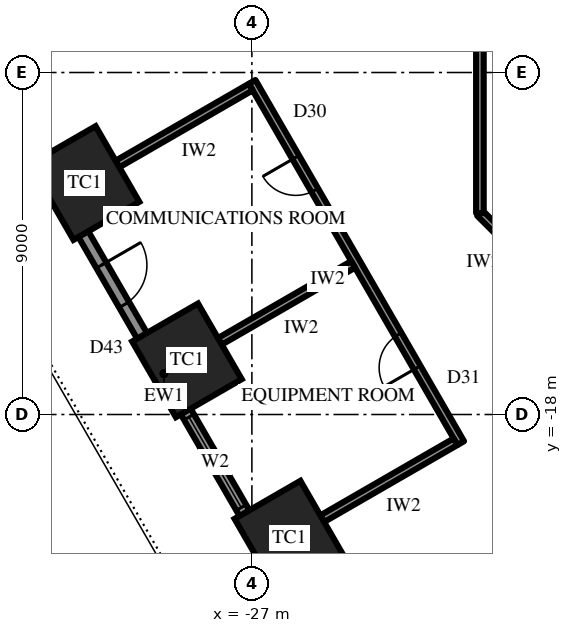
"""IFC4 building model, lengths in metres.
Left out: names, types, materials, properties, quantities, classifications, styles, units other than length and angle.
Written with IfcOpenShell. Run it as: python <this file> out.ifc"""

import sys

from ifc_helpers import new_model, si_unit, direction, frame, frame_2d, origin, origin_2d, place, context, subcontext, project, spatial, rectangle, extrude, element, fill, save


model = new_model("IFC4")
c1 = context("Model", 3, precision=1e-05, world=origin(), true_north=direction((0.0, 1.0)))
c2 = subcontext(c1, "Body", "Model", "MODEL_VIEW")
j1 = project(units=[si_unit("LENGTHUNIT", "METRE"), si_unit("PLANEANGLEUNIT", "RADIAN")], contexts=[c1])
p1 = place(None, origin())
s1 = spatial("IfcSite", under=j1, at=p1, CompositionType="ELEMENT")
p2 = place(p1, origin())
s2 = spatial("IfcBuilding", under=s1, at=p2, CompositionType="ELEMENT")
p3 = place(p2, frame((0.0, 0.0, 31.9)))
s3 = spatial("IfcBuildingStorey", under=s2, at=p3, CompositionType="ELEMENT", Elevation=31.9)
for number, where, z_axis, x_axis in (
    (1, (-31.403, -11.908, 0.0), (0.0, 0.0, 1.0), (0.5, -0.866, 0.0)),
    (2, (-28.709, -16.575, 0.0), (0.0, 0.0, 1.0), (0.5, -0.866, 0.0)),
    (3, (-26.014, -21.242, 0.0), (0.0, 0.0, 1.0), (0.5, -0.866, 0.0)),
):
    element("IfcColumn", number, at=place(p3, frame(where, z_axis=z_axis, x_axis=x_axis)), inside=s3, PredefinedType="COLUMN", context=c2, shape_type="SweptSolid", body=[
        extrude(rectangle(XDim=2.3, YDim=2.0, at=origin_2d()), origin(), (0.0, 0.0, 1.0), 4.2),
    ])
p4 = place(p3, frame((-37.398, -2.925, 0.0), z_axis=(0.0, 0.0, 1.0), x_axis=(0.499999163675, -0.866025886636, 0.0)))
e4 = element("IfcWall", 4, at=p4, inside=s3, PredefinedType="SOLIDWALL", context=c2, shape_type="SweptSolid", body=[
    extrude(rectangle(XDim=32.332, YDim=0.3, at=frame_2d((16.166, 0.0))), origin(), (0.0, 0.0, 1.0), 2.7),
])
p5 = place(p4, frame((1.319, 0.0, 0.6)))
e5 = element("IfcOpeningElement", 5, at=p5, cuts=e4, PredefinedType="OPENING", context=c2, shape_type="SweptSolid", body=[
    extrude(rectangle(XDim=2.75, YDim=1.85, at=frame_2d((1.375, 0.925))), frame((0.0, 0.16, 0.0), z_axis=(0.0, -1.0, 0.0), x_axis=(1.0, 0.0, 0.0)), (0.0, 0.0, 1.0), 0.32),
])
p6 = place(p4, frame((6.708, 0.0, 0.6)))
e6 = element("IfcOpeningElement", 6, at=p6, cuts=e4, PredefinedType="OPENING", context=c2, shape_type="SweptSolid", body=[
    extrude(rectangle(XDim=2.75, YDim=1.85, at=frame_2d((1.375, 0.925))), frame((0.0, 0.16, 0.0), z_axis=(0.0, -1.0, 0.0), x_axis=(1.0, 0.0, 0.0)), (0.0, 0.0, 1.0), 0.32),
])
p7 = place(p4, frame((12.872, 0.0, 0.0)))
e7 = element("IfcOpeningElement", 7, at=p7, cuts=e4, PredefinedType="OPENING", context=c2, shape_type="SweptSolid", body=[
    extrude(rectangle(XDim=1.2, YDim=2.4, at=frame_2d((0.6, 1.2))), frame((0.0, 0.16, 0.0), z_axis=(0.0, -1.0, 0.0), x_axis=(1.0, 0.0, 0.0)), (0.0, 0.0, 1.0), 0.32),
])
p8 = place(p4, frame((17.485, 0.0, 0.6)))
e8 = element("IfcOpeningElement", 8, at=p8, cuts=e4, PredefinedType="OPENING", context=c2, shape_type="SweptSolid", body=[
    extrude(rectangle(XDim=2.75, YDim=1.85, at=frame_2d((1.375, 0.925))), frame((0.0, 0.16, 0.0), z_axis=(0.0, -1.0, 0.0), x_axis=(1.0, 0.0, 0.0)), (0.0, 0.0, 1.0), 0.32),
])
p9 = place(p4, frame((22.874, 0.0, 0.6)))
e9 = element("IfcOpeningElement", 9, at=p9, cuts=e4, PredefinedType="OPENING", context=c2, shape_type="SweptSolid", body=[
    extrude(rectangle(XDim=2.75, YDim=1.85, at=frame_2d((1.375, 0.925))), frame((0.0, 0.16, 0.0), z_axis=(0.0, -1.0, 0.0), x_axis=(1.0, 0.0, 0.0)), (0.0, 0.0, 1.0), 0.32),
])
p10 = place(p4, frame((28.262, 0.0, 0.6)))
e10 = element("IfcOpeningElement", 10, at=p10, cuts=e4, PredefinedType="OPENING", context=c2, shape_type="SweptSolid", body=[
    extrude(rectangle(XDim=2.75, YDim=1.85, at=frame_2d((1.375, 0.925))), frame((0.0, 0.16, 0.0), z_axis=(0.0, -1.0, 0.0), x_axis=(1.0, 0.0, 0.0)), (0.0, 0.0, 1.0), 0.32),
])
p11 = place(p3, frame((-26.993, -9.247, 0.0), z_axis=(0.0, 0.0, 1.0), x_axis=(0.500002255551, -0.866024101537, 0.0)))
e11 = element("IfcWall", 11, at=p11, inside=s3, PredefinedType="PARTITIONING", context=c2, shape_type="SweptSolid", body=[
    extrude(rectangle(XDim=10.977, YDim=0.2, at=frame_2d((5.489, 0.0))), origin(), (0.0, 0.0, 1.0), 4.0),
])
p12 = place(p11, frame((2.294, 0.0, 0.0)))
e12 = element("IfcOpeningElement", 12, at=p12, cuts=e11, PredefinedType="OPENING", context=c2, shape_type="SweptSolid", body=[
    extrude(rectangle(XDim=1.0, YDim=2.2, at=frame_2d((0.5, 1.1))), frame((0.0, 0.11, 0.0), z_axis=(0.0, -1.0, 0.0), x_axis=(1.0, 0.0, 0.0)), (0.0, 0.0, 1.0), 0.22),
])
p13 = place(p11, frame((7.683, 0.0, 0.0)))
e13 = element("IfcOpeningElement", 13, at=p13, cuts=e11, PredefinedType="OPENING", context=c2, shape_type="SweptSolid", body=[
    extrude(rectangle(XDim=1.0, YDim=2.2, at=frame_2d((0.5, 1.1))), frame((0.0, 0.11, 0.0), z_axis=(0.0, -1.0, 0.0), x_axis=(1.0, 0.0, 0.0)), (0.0, 0.0, 1.0), 0.22),
])
p14 = place(p3, frame((-27.03, -9.383, 0.0), z_axis=(0.0, 0.0, 1.0), x_axis=(-0.866019956843, -0.50000943426, 0.0)))
e14 = element("IfcWall", 14, at=p14, inside=s3, PredefinedType="PARTITIONING", context=c2, shape_type="SweptSolid", body=[
    extrude(rectangle(XDim=4.05, YDim=0.2, at=frame_2d((2.025, 0.0))), origin(), (0.0, 0.0, 1.0), 2.944),
])
p15 = place(p3, frame((-24.335, -14.05, 0.0), z_axis=(0.0, 0.0, 1.0), x_axis=(-0.866046058097, -0.499964223975, 0.0)))
e15 = element("IfcWall", 15, at=p15, inside=s3, PredefinedType="PARTITIONING", context=c2, shape_type="SweptSolid", body=[
    extrude(rectangle(XDim=4.05, YDim=0.2, at=frame_2d((2.025, 0.0))), origin(), (0.0, 0.0, 1.0), 4.0),
])
p16 = place(p3, frame((-21.641, -18.717, 0.0), z_axis=(0.0, 0.0, 1.0), x_axis=(-0.866004885491, -0.500035537042, 0.0)))
e16 = element("IfcWall", 16, at=p16, inside=s3, PredefinedType="PARTITIONING", context=c2, shape_type="SweptSolid", body=[
    extrude(rectangle(XDim=4.05, YDim=0.2, at=frame_2d((2.025, 0.0))), origin(), (0.0, 0.0, 1.0), 2.992),
])
p17 = place(p3, frame((-19.6, -14.1, 0.0), z_axis=(0.0, 0.0, 1.0), x_axis=(-0.707045124756, 0.707168432242, 0.0)))
e17 = element("IfcWall", 17, at=p17, inside=s3, PredefinedType="PARTITIONING", context=c2, shape_type="SweptSolid", body=[
    extrude(rectangle(XDim=1.98, YDim=0.2, at=frame_2d((0.99, 0.0))), origin(), (0.0, 0.0, 1.0), 4.0),
])
p18 = place(p3, frame((-21.0, -12.7, 0.0), z_axis=(0.0, 0.0, 1.0), x_axis=(0.0, 1.0, 0.0)))
e18 = element("IfcWall", 18, at=p18, inside=s3, PredefinedType="PARTITIONING", context=c2, shape_type="SweptSolid", body=[
    extrude(rectangle(XDim=25.4, YDim=0.2, at=frame_2d((12.7, 0.0))), origin(), (0.0, 0.0, 1.0), 4.0),
])
p19 = place(p18, frame((11.8, 0.0, 0.0)))
e19 = element("IfcOpeningElement", 19, at=p19, cuts=e18, PredefinedType="OPENING", context=c2, shape_type="SweptSolid", body=[
    extrude(rectangle(XDim=1.8, YDim=2.4, at=frame_2d((0.9, 1.2))), frame((0.0, 0.11, 0.0), z_axis=(0.0, -1.0, 0.0), x_axis=(1.0, 0.0, 0.0)), (0.0, 0.0, 1.0), 0.22),
])
p20 = place(p7, origin())
e20 = element("IfcDoor", 20, at=p20, inside=s3, OperationType="SINGLE_SWING_RIGHT", PredefinedType="DOOR", context=c2, shape_type="SweptSolid", body=[
    extrude(rectangle(XDim=1.2, YDim=2.4, at=frame_2d((0.6, 1.2))), frame((0.0, 0.025, 0.0), z_axis=(0.0, -1.0, 0.0), x_axis=(1.0, 0.0, 0.0)), (0.0, 0.0, 1.0), 0.05),
])
fill(e7, e20)
p21 = place(p8, origin())
e21 = element("IfcWindow", 21, at=p21, inside=s3, PartitioningType="SINGLE_PANEL", PredefinedType="WINDOW", context=c2, shape_type="SweptSolid", body=[
    extrude(rectangle(XDim=2.75, YDim=1.85, at=frame_2d((1.375, 0.925))), frame((0.0, 0.03, 0.0), z_axis=(0.0, -1.0, 0.0), x_axis=(1.0, 0.0, 0.0)), (0.0, 0.0, 1.0), 0.06),
])
fill(e8, e21)
p22 = place(p12, frame((1.0, 0.0, 0.0), z_axis=(0.0, 0.0, 1.0), x_axis=(-1.0, 0.0, 0.0)))
e22 = element("IfcDoor", 22, at=p22, inside=s3, OperationType="SINGLE_SWING_LEFT", PredefinedType="DOOR", context=c2, shape_type="SweptSolid", body=[
    extrude(rectangle(XDim=1.0, YDim=2.2, at=frame_2d((0.5, 1.1))), frame((0.0, 0.025, 0.0), z_axis=(0.0, -1.0, 0.0), x_axis=(1.0, 0.0, 0.0)), (0.0, 0.0, 1.0), 0.05),
])
fill(e12, e22)
p23 = place(p13, frame((1.0, 0.0, 0.0), z_axis=(0.0, 0.0, 1.0), x_axis=(-1.0, 0.0, 0.0)))
e23 = element("IfcDoor", 23, at=p23, inside=s3, OperationType="SINGLE_SWING_RIGHT", PredefinedType="DOOR", context=c2, shape_type="SweptSolid", body=[
    extrude(rectangle(XDim=1.0, YDim=2.2, at=frame_2d((0.5, 1.1))), frame((0.0, 0.025, 0.0), z_axis=(0.0, -1.0, 0.0), x_axis=(1.0, 0.0, 0.0)), (0.0, 0.0, 1.0), 0.05),
])
fill(e13, e23)
save(model, sys.argv[1])
